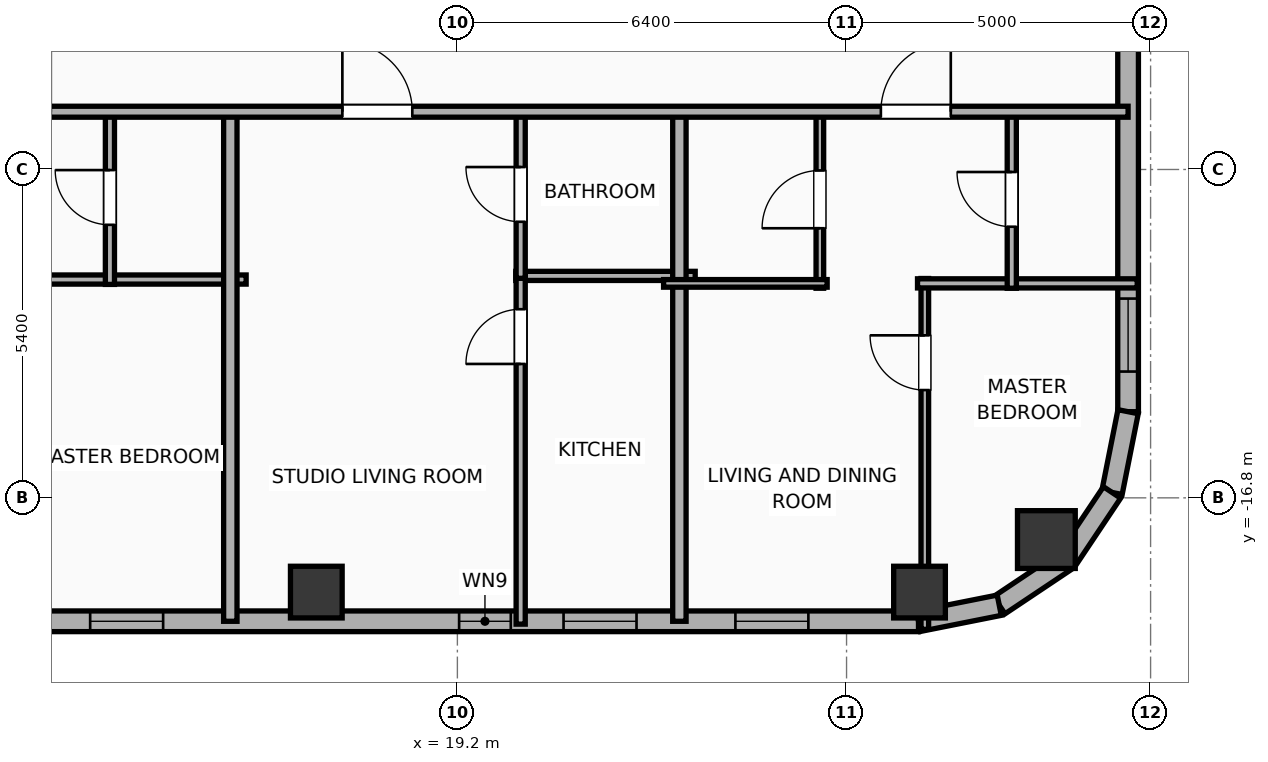
"""IFC4 building model, lengths in metres.
Left out: names, types, materials, properties, quantities, classifications, styles, units other than length and angle.
Written with IfcOpenShell. Run it as: python <this file> out.ifc"""

import sys

from ifc_helpers import new_model, si_unit, direction, frame, frame_2d, origin, origin_2d, place, context, subcontext, project, spatial, rectangle, hollow_rectangle, hollow_circle, extrude, element, fill, save


model = new_model("IFC4")
c1 = context("Model", 3, precision=1e-05, world=origin(), true_north=direction((0.0, 1.0)))
c2 = subcontext(c1, "Body", "Model", "MODEL_VIEW")
j1 = project(units=[si_unit("LENGTHUNIT", "METRE"), si_unit("PLANEANGLEUNIT", "RADIAN")], contexts=[c1])
p1 = place(None, origin())
s1 = spatial("IfcSite", under=j1, at=p1, CompositionType="ELEMENT")
p2 = place(p1, origin())
s2 = spatial("IfcBuilding", under=s1, at=p2, CompositionType="ELEMENT")
p3 = place(p2, frame((0.0, 0.0, 250.9)))
s3 = spatial("IfcBuildingStorey", under=s2, at=p3, CompositionType="ELEMENT", Elevation=250.9)
for number, where, z_axis, x_axis in (
    (1, (16.88, -18.35, 0.0), (0.0, 0.0, 1.0), (1.0, 0.0, 0.0)),
    (2, (26.8, -18.35, 0.0), (0.0, 0.0, 1.0), (1.0, 0.0, 0.0)),
):
    element("IfcColumn", number, at=place(p3, frame(where, z_axis=z_axis, x_axis=x_axis)), inside=s3, PredefinedType="COLUMN", context=c2, shape_type="SweptSolid", body=[
        extrude(hollow_rectangle(XDim=0.85, YDim=0.85, WallThickness=0.028, at=origin_2d()), origin(), (0.0, 0.0, 1.0), 3.865),
    ])
p4 = place(p3, frame((28.886, -17.486, 0.0), z_axis=(0.0, 0.0, 1.0), x_axis=(1.0, 0.0, 0.0)))
e3 = element("IfcColumn", 3, at=p4, inside=s3, PredefinedType="COLUMN", context=c2, shape_type="SweptSolid", body=[
    extrude(hollow_circle(Radius=0.475, WallThickness=0.032, at=origin_2d()), origin(), (0.0, 0.0, 1.0), 3.865),
])
p5 = place(p3, frame((26.783, -18.83, 0.0), z_axis=(0.0, 0.0, 1.0), x_axis=(-1.0, 0.0, 0.0)))
e4 = element("IfcWall", 4, at=p5, inside=s3, PredefinedType="ELEMENTEDWALL", context=c2, shape_type="SweptSolid", body=[
    extrude(rectangle(XDim=49.566, YDim=0.34, at=frame_2d((24.783, 0.0))), origin(), (0.0, 0.0, 1.0), 2.39),
])
p6 = place(p5, frame((23.583, 0.0, 0.75)))
e5 = element("IfcOpeningElement", 5, at=p6, cuts=e4, PredefinedType="OPENING", context=c2, shape_type="SweptSolid", body=[
    extrude(rectangle(XDim=2.4, YDim=1.45, at=frame_2d((1.2, 0.725))), frame((0.0, 0.18, 0.0), z_axis=(0.0, -1.0, 0.0), x_axis=(1.0, 0.0, 0.0)), (0.0, 0.0, 1.0), 0.36),
])
p7 = place(p5, frame((41.756, 0.0, 0.75)))
e6 = element("IfcOpeningElement", 6, at=p7, cuts=e4, PredefinedType="OPENING", context=c2, shape_type="SweptSolid", body=[
    extrude(rectangle(XDim=2.4, YDim=1.45, at=frame_2d((1.2, 0.725))), frame((0.0, 0.18, 0.0), z_axis=(0.0, -1.0, 0.0), x_axis=(1.0, 0.0, 0.0)), (0.0, 0.0, 1.0), 0.36),
])
p8 = place(p5, frame((47.222, 0.0, 0.55)))
e7 = element("IfcOpeningElement", 7, at=p8, cuts=e4, PredefinedType="OPENING", context=c2, shape_type="SweptSolid", body=[
    extrude(rectangle(XDim=1.2, YDim=1.15, at=frame_2d((0.6, 0.575))), frame((0.0, 0.18, 0.0), z_axis=(0.0, -1.0, 0.0), x_axis=(1.0, 0.0, 0.0)), (0.0, 0.0, 1.0), 0.36),
])
p9 = place(p5, frame((45.181, 0.0, 0.55)))
e8 = element("IfcOpeningElement", 8, at=p9, cuts=e4, PredefinedType="OPENING", context=c2, shape_type="SweptSolid", body=[
    extrude(rectangle(XDim=1.2, YDim=1.15, at=frame_2d((0.6, 0.575))), frame((0.0, 0.18, 0.0), z_axis=(0.0, -1.0, 0.0), x_axis=(1.0, 0.0, 0.0)), (0.0, 0.0, 1.0), 0.36),
])
p10 = place(p5, frame((37.289, 0.0, 0.55)))
e9 = element("IfcOpeningElement", 9, at=p10, cuts=e4, PredefinedType="OPENING", context=c2, shape_type="SweptSolid", body=[
    extrude(rectangle(XDim=1.2, YDim=1.15, at=frame_2d((0.6, 0.575))), frame((0.0, 0.18, 0.0), z_axis=(0.0, -1.0, 0.0), x_axis=(1.0, 0.0, 0.0)), (0.0, 0.0, 1.0), 0.36),
])
p11 = place(p5, frame((16.115, 0.0, 0.55)))
e10 = element("IfcOpeningElement", 10, at=p11, cuts=e4, PredefinedType="OPENING", context=c2, shape_type="SweptSolid", body=[
    extrude(rectangle(XDim=1.2, YDim=1.15, at=frame_2d((0.6, 0.575))), frame((0.0, 0.18, 0.0), z_axis=(0.0, -1.0, 0.0), x_axis=(1.0, 0.0, 0.0)), (0.0, 0.0, 1.0), 0.36),
])
p12 = place(p5, frame((12.422, 0.0, 0.55)))
e11 = element("IfcOpeningElement", 11, at=p12, cuts=e4, PredefinedType="OPENING", context=c2, shape_type="SweptSolid", body=[
    extrude(rectangle(XDim=1.2, YDim=1.15, at=frame_2d((0.6, 0.575))), frame((0.0, 0.18, 0.0), z_axis=(0.0, -1.0, 0.0), x_axis=(1.0, 0.0, 0.0)), (0.0, 0.0, 1.0), 0.36),
])
p13 = place(p5, frame((6.705, 0.0, 0.55)))
e12 = element("IfcOpeningElement", 12, at=p13, cuts=e4, PredefinedType="OPENING", context=c2, shape_type="SweptSolid", body=[
    extrude(rectangle(XDim=0.85, YDim=1.15, at=frame_2d((0.425, 0.575))), frame((0.0, 0.18, 0.0), z_axis=(0.0, -1.0, 0.0), x_axis=(1.0, 0.0, 0.0)), (0.0, 0.0, 1.0), 0.36),
])
p14 = place(p5, frame((4.637, 0.0, 0.55)))
e13 = element("IfcOpeningElement", 13, at=p14, cuts=e4, PredefinedType="OPENING", context=c2, shape_type="SweptSolid", body=[
    extrude(rectangle(XDim=1.2, YDim=1.15, at=frame_2d((0.6, 0.575))), frame((0.0, 0.18, 0.0), z_axis=(0.0, -1.0, 0.0), x_axis=(1.0, 0.0, 0.0)), (0.0, 0.0, 1.0), 0.36),
])
p15 = place(p5, frame((1.811, 0.0, 0.55)))
e14 = element("IfcOpeningElement", 14, at=p15, cuts=e4, PredefinedType="OPENING", context=c2, shape_type="SweptSolid", body=[
    extrude(rectangle(XDim=1.2, YDim=1.15, at=frame_2d((0.6, 0.575))), frame((0.0, 0.18, 0.0), z_axis=(0.0, -1.0, 0.0), x_axis=(1.0, 0.0, 0.0)), (0.0, 0.0, 1.0), 0.36),
])
p16 = place(p5, frame((32.253, 0.0, 0.55)))
e15 = element("IfcOpeningElement", 15, at=p16, cuts=e4, PredefinedType="OPENING", context=c2, shape_type="SweptSolid", body=[
    extrude(rectangle(XDim=1.2, YDim=1.15, at=frame_2d((0.6, 0.575))), frame((0.0, 0.18, 0.0), z_axis=(0.0, -1.0, 0.0), x_axis=(1.0, 0.0, 0.0)), (0.0, 0.0, 1.0), 0.36),
])
p17 = place(p5, frame((27.853, 0.0, 0.55)))
e16 = element("IfcOpeningElement", 16, at=p17, cuts=e4, PredefinedType="OPENING", context=c2, shape_type="SweptSolid", body=[
    extrude(rectangle(XDim=1.2, YDim=1.15, at=frame_2d((0.6, 0.575))), frame((0.0, 0.18, 0.0), z_axis=(0.0, -1.0, 0.0), x_axis=(1.0, 0.0, 0.0)), (0.0, 0.0, 1.0), 0.36),
])
p18 = place(p5, frame((20.473, 0.0, 0.55)))
e17 = element("IfcOpeningElement", 17, at=p18, cuts=e4, PredefinedType="OPENING", context=c2, shape_type="SweptSolid", body=[
    extrude(rectangle(XDim=1.2, YDim=1.15, at=frame_2d((0.6, 0.575))), frame((0.0, 0.18, 0.0), z_axis=(0.0, -1.0, 0.0), x_axis=(1.0, 0.0, 0.0)), (0.0, 0.0, 1.0), 0.36),
])
p19 = place(p3, frame((30.23, 16.583, 0.0), z_axis=(0.0, 0.0, 1.0), x_axis=(0.0, -1.0, 0.0)))
e18 = element("IfcWall", 18, at=p19, inside=s3, PredefinedType="ELEMENTEDWALL", context=c2, shape_type="SweptSolid", body=[
    extrude(rectangle(XDim=31.967, YDim=0.34, at=frame_2d((15.983, 0.0))), origin(), (0.0, 0.0, 1.0), 2.39),
])
p20 = place(p19, frame((30.106, 0.0, 0.55)))
e19 = element("IfcOpeningElement", 19, at=p20, cuts=e18, PredefinedType="OPENING", context=c2, shape_type="SweptSolid", body=[
    extrude(rectangle(XDim=1.2, YDim=1.15, at=frame_2d((0.6, 0.575))), frame((0.0, 0.18, 0.0), z_axis=(0.0, -1.0, 0.0), x_axis=(1.0, 0.0, 0.0)), (0.0, 0.0, 1.0), 0.36),
])
p21 = place(p19, frame((11.463, 0.0, 0.55)))
e20 = element("IfcOpeningElement", 20, at=p21, cuts=e18, PredefinedType="OPENING", context=c2, shape_type="SweptSolid", body=[
    extrude(rectangle(XDim=1.2, YDim=1.15, at=frame_2d((0.6, 0.575))), frame((0.0, 0.18, 0.0), z_axis=(0.0, -1.0, 0.0), x_axis=(1.0, 0.0, 0.0)), (0.0, 0.0, 1.0), 0.36),
])
p22 = place(p19, frame((20.363, 0.0, 0.55)))
e21 = element("IfcOpeningElement", 21, at=p22, cuts=e18, PredefinedType="OPENING", context=c2, shape_type="SweptSolid", body=[
    extrude(rectangle(XDim=1.2, YDim=1.15, at=frame_2d((0.6, 0.575))), frame((0.0, 0.18, 0.0), z_axis=(0.0, -1.0, 0.0), x_axis=(1.0, 0.0, 0.0)), (0.0, 0.0, 1.0), 0.36),
])
p23 = place(p3, frame((30.23, -15.383, 0.0), z_axis=(0.0, 0.0, 1.0), x_axis=(-0.195110379894, -0.98078129043, 0.0)))
e22 = element("IfcWall", 22, at=p23, inside=s3, PredefinedType="ELEMENTEDWALL", context=c2, shape_type="SweptSolid", body=[
    extrude(rectangle(XDim=1.354, YDim=0.34, at=frame_2d((0.677, 0.0))), origin(), (0.0, 0.0, 1.0), 3.5),
])
p24 = place(p3, frame((29.966, -16.711, 0.0), z_axis=(0.0, 0.0, 1.0), x_axis=(-0.555584683399, -0.831459956686, 0.0)))
e23 = element("IfcWall", 23, at=p24, inside=s3, PredefinedType="ELEMENTEDWALL", context=c2, shape_type="SweptSolid", body=[
    extrude(rectangle(XDim=1.337, YDim=0.34, at=frame_2d((0.668, 0.0))), origin(), (0.0, 0.0, 1.0), 3.5),
])
p25 = place(p3, frame((29.223, -17.823, 0.0), z_axis=(0.0, 0.0, 1.0), x_axis=(-0.831403586725, -0.555669034571, 0.0)))
e24 = element("IfcWall", 24, at=p25, inside=s3, PredefinedType="ELEMENTEDWALL", context=c2, shape_type="SweptSolid", body=[
    extrude(rectangle(XDim=1.337, YDim=0.34, at=frame_2d((0.668, 0.0))), origin(), (0.0, 0.0, 1.0), 2.39),
])
p26 = place(p3, frame((28.111, -18.566, 0.0), z_axis=(0.0, 0.0, 1.0), x_axis=(-0.980788153188, -0.195075878998, 0.0)))
e25 = element("IfcWall", 25, at=p26, inside=s3, PredefinedType="ELEMENTEDWALL", context=c2, shape_type="SweptSolid", body=[
    extrude(rectangle(XDim=1.354, YDim=0.34, at=frame_2d((0.677, 0.0))), origin(), (0.0, 0.0, 1.0), 2.39),
])
p27 = place(p3, frame((11.936, -13.21, 0.0), z_axis=(0.0, 0.0, 1.0), x_axis=(1.0, 0.0, 0.0)))
e26 = element("IfcWall", 26, at=p27, inside=s3, PredefinedType="PLUMBINGWALL", context=c2, shape_type="SweptSolid", body=[
    extrude(rectangle(XDim=3.79, YDim=0.15, at=frame_2d((1.895, 0.0))), origin(), (0.0, 0.0, 1.0), 3.5),
])
p28 = place(p3, frame((13.486, -13.29, 0.0), z_axis=(0.0, 0.0, 1.0), x_axis=(0.0, 1.0, 0.0)))
e27 = element("IfcWall", 27, at=p28, inside=s3, PredefinedType="PLUMBINGWALL", context=c2, shape_type="SweptSolid", body=[
    extrude(rectangle(XDim=2.86, YDim=0.15, at=frame_2d((1.43, 0.0))), origin(), (0.0, 0.0, 1.0), 3.5),
])
p29 = place(p28, frame((0.98, 0.0, 0.0)))
e28 = element("IfcOpeningElement", 28, at=p29, cuts=e27, PredefinedType="OPENING", context=c2, shape_type="SweptSolid", body=[
    extrude(rectangle(XDim=0.9, YDim=2.05, at=frame_2d((0.45, 1.025))), frame((0.0, 0.085, 0.0), z_axis=(0.0, -1.0, 0.0), x_axis=(1.0, 0.0, 0.0)), (0.0, 0.0, 1.0), 0.17),
])
p30 = place(p3, frame((15.466, -18.83, 0.0), z_axis=(0.0, 0.0, 1.0), x_axis=(0.0, 1.0, 0.0)))
e29 = element("IfcWall", 29, at=p30, inside=s3, PredefinedType="PARTITIONING", context=c2, shape_type="SweptSolid", body=[
    extrude(rectangle(XDim=8.46, YDim=0.22, at=frame_2d((4.23, 0.0))), origin(), (0.0, 0.0, 1.0), 2.39),
])
p31 = place(p3, frame((20.161, -13.15, 0.0), z_axis=(0.0, 0.0, 1.0), x_axis=(1.0, 0.0, 0.0)))
e30 = element("IfcWall", 30, at=p31, inside=s3, PredefinedType="PLUMBINGWALL", context=c2, shape_type="SweptSolid", body=[
    extrude(rectangle(XDim=2.95, YDim=0.15, at=frame_2d((1.475, 0.0))), origin(), (0.0, 0.0, 1.0), 3.5),
])
p32 = place(p3, frame((20.241, -18.877, 0.0), z_axis=(0.0, 0.0, 1.0), x_axis=(0.0, 1.0, 0.0)))
e31 = element("IfcWall", 31, at=p32, inside=s3, PredefinedType="PLUMBINGWALL", context=c2, shape_type="SweptSolid", body=[
    extrude(rectangle(XDim=5.767, YDim=0.15, at=frame_2d((2.883, 0.0))), origin(), (0.0, 0.0, 1.0), 2.39),
])
p33 = place(p32, frame((4.279, 0.0, 0.0)))
e32 = element("IfcOpeningElement", 32, at=p33, cuts=e31, PredefinedType="OPENING", context=c2, shape_type="SweptSolid", body=[
    extrude(rectangle(XDim=0.9, YDim=2.05, at=frame_2d((0.45, 1.025))), frame((0.0, 0.085, 0.0), z_axis=(0.0, -1.0, 0.0), x_axis=(1.0, 0.0, 0.0)), (0.0, 0.0, 1.0), 0.17),
])
p34 = place(p3, frame((20.241, -13.19, 0.0), z_axis=(0.0, 0.0, 1.0), x_axis=(0.0, 1.0, 0.0)))
e33 = element("IfcWall", 33, at=p34, inside=s3, PredefinedType="PLUMBINGWALL", context=c2, shape_type="SweptSolid", body=[
    extrude(rectangle(XDim=2.76, YDim=0.15, at=frame_2d((1.38, 0.0))), origin(), (0.0, 0.0, 1.0), 2.39),
])
p35 = place(p34, frame((0.93, 0.0, 0.0)))
e34 = element("IfcOpeningElement", 34, at=p35, cuts=e33, PredefinedType="OPENING", context=c2, shape_type="SweptSolid", body=[
    extrude(rectangle(XDim=0.9, YDim=2.05, at=frame_2d((0.45, 1.025))), frame((0.0, 0.085, 0.0), z_axis=(0.0, -1.0, 0.0), x_axis=(1.0, 0.0, 0.0)), (0.0, 0.0, 1.0), 0.17),
])
p36 = place(p3, frame((22.851, -18.83, 0.0), z_axis=(0.0, 0.0, 1.0), x_axis=(0.0, 1.0, 0.0)))
e35 = element("IfcWall", 35, at=p36, inside=s3, PredefinedType="PARTITIONING", context=c2, shape_type="SweptSolid", body=[
    extrude(rectangle(XDim=8.46, YDim=0.22, at=frame_2d((4.23, 0.0))), origin(), (0.0, 0.0, 1.0), 2.39),
])
p37 = place(p3, frame((26.887, -18.962, 0.0), z_axis=(0.0, 0.0, 1.0), x_axis=(0.0, 1.0, 0.0)))
e36 = element("IfcWall", 36, at=p37, inside=s3, PredefinedType="PARTITIONING", context=c2, shape_type="SweptSolid", body=[
    extrude(rectangle(XDim=5.769, YDim=0.125, at=frame_2d((2.885, 0.0))), origin(), (0.0, 0.0, 1.0), 3.5),
])
p38 = place(p37, frame((3.935, 0.0, 0.0)))
e37 = element("IfcOpeningElement", 37, at=p38, cuts=e36, PredefinedType="OPENING", context=c2, shape_type="SweptSolid", body=[
    extrude(rectangle(XDim=0.9, YDim=2.05, at=frame_2d((0.45, 1.025))), frame((0.0, 0.073, 0.0), z_axis=(0.0, -1.0, 0.0), x_axis=(1.0, 0.0, 0.0)), (0.0, 0.0, 1.0), 0.145),
])
p39 = place(p3, frame((26.767, -13.273, 0.0), z_axis=(0.0, 0.0, 1.0), x_axis=(1.0, 0.0, 0.0)))
e38 = element("IfcWall", 38, at=p39, inside=s3, PredefinedType="PLUMBINGWALL", context=c2, shape_type="SweptSolid", body=[
    extrude(rectangle(XDim=3.613, YDim=0.15, at=frame_2d((1.806, 0.0))), origin(), (0.0, 0.0, 1.0), 3.5),
])
p40 = place(p3, frame((25.161, -13.353, 0.0), z_axis=(0.0, 0.0, 1.0), x_axis=(0.0, 1.0, 0.0)))
e39 = element("IfcWall", 39, at=p40, inside=s3, PredefinedType="PARTITIONING", context=c2, shape_type="SweptSolid", body=[
    extrude(rectangle(XDim=2.923, YDim=0.125, at=frame_2d((1.461, 0.0))), origin(), (0.0, 0.0, 1.0), 3.5),
])
p41 = place(p40, frame((0.987, 0.0, 0.0)))
e40 = element("IfcOpeningElement", 40, at=p41, cuts=e39, PredefinedType="OPENING", context=c2, shape_type="SweptSolid", body=[
    extrude(rectangle(XDim=0.95, YDim=2.05, at=frame_2d((0.475, 1.025))), frame((0.0, 0.073, 0.0), z_axis=(0.0, -1.0, 0.0), x_axis=(1.0, 0.0, 0.0)), (0.0, 0.0, 1.0), 0.145),
])
p42 = place(p3, frame((22.591, -13.273, 0.0), z_axis=(0.0, 0.0, 1.0), x_axis=(1.0, 0.0, 0.0)))
e41 = element("IfcWall", 41, at=p42, inside=s3, PredefinedType="PARTITIONING", context=c2, shape_type="SweptSolid", body=[
    extrude(rectangle(XDim=2.69, YDim=0.125, at=frame_2d((1.345, 0.0))), origin(), (0.0, 0.0, 1.0), 3.5),
])
p43 = place(p3, frame((28.317, -13.353, 0.0), z_axis=(0.0, 0.0, 1.0), x_axis=(0.0, 1.0, 0.0)))
e42 = element("IfcWall", 42, at=p43, inside=s3, PredefinedType="PLUMBINGWALL", context=c2, shape_type="SweptSolid", body=[
    extrude(rectangle(XDim=2.923, YDim=0.15, at=frame_2d((1.461, 0.0))), origin(), (0.0, 0.0, 1.0), 3.5),
])
p44 = place(p43, frame((1.011, 0.0, 0.0)))
e43 = element("IfcOpeningElement", 43, at=p44, cuts=e42, PredefinedType="OPENING", context=c2, shape_type="SweptSolid", body=[
    extrude(rectangle(XDim=0.9, YDim=2.05, at=frame_2d((0.45, 1.025))), frame((0.0, 0.085, 0.0), z_axis=(0.0, -1.0, 0.0), x_axis=(1.0, 0.0, 0.0)), (0.0, 0.0, 1.0), 0.17),
])
p45 = place(p3, frame((8.08, -10.45, 0.0), z_axis=(0.0, 0.0, 1.0), x_axis=(1.0, 0.0, 0.0)))
e44 = element("IfcWall", 44, at=p45, inside=s3, PredefinedType="PARTITIONING", context=c2, shape_type="SweptSolid", body=[
    extrude(rectangle(XDim=22.15, YDim=0.18, at=frame_2d((11.075, 0.0))), origin(), (0.0, 0.0, 1.0), 3.5),
])
p46 = place(p45, frame((3.283, 0.0, 0.0)))
e45 = element("IfcOpeningElement", 45, at=p46, cuts=e44, PredefinedType="OPENING", context=c2, shape_type="SweptSolid", body=[
    extrude(rectangle(XDim=1.15, YDim=2.05, at=frame_2d((0.575, 1.025))), frame((0.0, 0.1, 0.0), z_axis=(0.0, -1.0, 0.0), x_axis=(1.0, 0.0, 0.0)), (0.0, 0.0, 1.0), 0.2),
])
p47 = place(p45, frame((9.229, 0.0, 0.0)))
e46 = element("IfcOpeningElement", 46, at=p47, cuts=e44, PredefinedType="OPENING", context=c2, shape_type="SweptSolid", body=[
    extrude(rectangle(XDim=1.15, YDim=2.05, at=frame_2d((0.575, 1.025))), frame((0.0, 0.1, 0.0), z_axis=(0.0, -1.0, 0.0), x_axis=(1.0, 0.0, 0.0)), (0.0, 0.0, 1.0), 0.2),
])
p48 = place(p45, frame((18.084, 0.0, 0.0)))
e47 = element("IfcOpeningElement", 47, at=p48, cuts=e44, PredefinedType="OPENING", context=c2, shape_type="SweptSolid", body=[
    extrude(rectangle(XDim=1.15, YDim=2.05, at=frame_2d((0.575, 1.025))), frame((0.0, 0.1, 0.0), z_axis=(0.0, -1.0, 0.0), x_axis=(1.0, 0.0, 0.0)), (0.0, 0.0, 1.0), 0.2),
])
p49 = place(p12, origin())
e48 = element("IfcWindow", 48, at=p49, inside=s3, PartitioningType="SINGLE_PANEL", PredefinedType="WINDOW", context=c2, shape_type="SweptSolid", body=[
    extrude(rectangle(XDim=1.2, YDim=1.15, at=frame_2d((0.6, 0.575))), frame((0.0, 0.03, 0.0), z_axis=(0.0, -1.0, 0.0), x_axis=(1.0, 0.0, 0.0)), (0.0, 0.0, 1.0), 0.06),
])
fill(e11, e48)
p50 = place(p13, origin())
e49 = element("IfcWindow", 49, at=p50, inside=s3, PartitioningType="SINGLE_PANEL", PredefinedType="WINDOW", context=c2, shape_type="SweptSolid", body=[
    extrude(rectangle(XDim=0.85, YDim=1.15, at=frame_2d((0.425, 0.575))), frame((0.0, 0.03, 0.0), z_axis=(0.0, -1.0, 0.0), x_axis=(1.0, 0.0, 0.0)), (0.0, 0.0, 1.0), 0.06),
])
fill(e12, e49)
p51 = place(p14, origin())
e50 = element("IfcWindow", 50, at=p51, inside=s3, PartitioningType="SINGLE_PANEL", PredefinedType="WINDOW", context=c2, shape_type="SweptSolid", body=[
    extrude(rectangle(XDim=1.2, YDim=1.15, at=frame_2d((0.6, 0.575))), frame((0.0, 0.03, 0.0), z_axis=(0.0, -1.0, 0.0), x_axis=(1.0, 0.0, 0.0)), (0.0, 0.0, 1.0), 0.06),
])
fill(e13, e50)
p52 = place(p15, origin())
e51 = element("IfcWindow", 51, at=p52, inside=s3, PartitioningType="SINGLE_PANEL", PredefinedType="WINDOW", context=c2, shape_type="SweptSolid", body=[
    extrude(rectangle(XDim=1.2, YDim=1.15, at=frame_2d((0.6, 0.575))), frame((0.0, 0.03, 0.0), z_axis=(0.0, -1.0, 0.0), x_axis=(1.0, 0.0, 0.0)), (0.0, 0.0, 1.0), 0.06),
])
fill(e14, e51)
p53 = place(p20, origin())
e52 = element("IfcWindow", 52, at=p53, inside=s3, PartitioningType="SINGLE_PANEL", PredefinedType="WINDOW", context=c2, shape_type="SweptSolid", body=[
    extrude(rectangle(XDim=1.2, YDim=1.15, at=frame_2d((0.6, 0.575))), frame((0.0, 0.03, 0.0), z_axis=(0.0, -1.0, 0.0), x_axis=(1.0, 0.0, 0.0)), (0.0, 0.0, 1.0), 0.06),
])
fill(e19, e52)
p54 = place(p29, origin())
e53 = element("IfcDoor", 53, at=p54, inside=s3, OperationType="SINGLE_SWING_RIGHT", PredefinedType="DOOR", context=c2, shape_type="SweptSolid", body=[
    extrude(rectangle(XDim=0.9, YDim=2.05, at=frame_2d((0.45, 1.025))), frame((0.0, 0.025, 0.0), z_axis=(0.0, -1.0, 0.0), x_axis=(1.0, 0.0, 0.0)), (0.0, 0.0, 1.0), 0.05),
])
fill(e28, e53)
p55 = place(p33, origin())
e54 = element("IfcDoor", 54, at=p55, inside=s3, OperationType="SINGLE_SWING_LEFT", PredefinedType="DOOR", context=c2, shape_type="SweptSolid", body=[
    extrude(rectangle(XDim=0.9, YDim=2.05, at=frame_2d((0.45, 1.025))), frame((0.0, 0.025, 0.0), z_axis=(0.0, -1.0, 0.0), x_axis=(1.0, 0.0, 0.0)), (0.0, 0.0, 1.0), 0.05),
])
fill(e32, e54)
p56 = place(p35, origin())
e55 = element("IfcDoor", 55, at=p56, inside=s3, OperationType="SINGLE_SWING_RIGHT", PredefinedType="DOOR", context=c2, shape_type="SweptSolid", body=[
    extrude(rectangle(XDim=0.9, YDim=2.05, at=frame_2d((0.45, 1.025))), frame((0.0, 0.025, 0.0), z_axis=(0.0, -1.0, 0.0), x_axis=(1.0, 0.0, 0.0)), (0.0, 0.0, 1.0), 0.05),
])
fill(e34, e55)
p57 = place(p38, origin())
e56 = element("IfcDoor", 56, at=p57, inside=s3, OperationType="SINGLE_SWING_RIGHT", PredefinedType="DOOR", context=c2, shape_type="SweptSolid", body=[
    extrude(rectangle(XDim=0.9, YDim=2.05, at=frame_2d((0.45, 1.025))), frame((0.0, 0.025, 0.0), z_axis=(0.0, -1.0, 0.0), x_axis=(1.0, 0.0, 0.0)), (0.0, 0.0, 1.0), 0.05),
])
fill(e37, e56)
p58 = place(p41, origin())
e57 = element("IfcDoor", 57, at=p58, inside=s3, OperationType="SINGLE_SWING_LEFT", PredefinedType="DOOR", context=c2, shape_type="SweptSolid", body=[
    extrude(rectangle(XDim=0.95, YDim=2.05, at=frame_2d((0.475, 1.025))), frame((0.0, 0.025, 0.0), z_axis=(0.0, -1.0, 0.0), x_axis=(1.0, 0.0, 0.0)), (0.0, 0.0, 1.0), 0.05),
])
fill(e40, e57)
p59 = place(p44, origin())
e58 = element("IfcDoor", 58, at=p59, inside=s3, OperationType="SINGLE_SWING_RIGHT", PredefinedType="DOOR", context=c2, shape_type="SweptSolid", body=[
    extrude(rectangle(XDim=0.9, YDim=2.05, at=frame_2d((0.45, 1.025))), frame((0.0, 0.025, 0.0), z_axis=(0.0, -1.0, 0.0), x_axis=(1.0, 0.0, 0.0)), (0.0, 0.0, 1.0), 0.05),
])
fill(e43, e58)
p60 = place(p47, origin())
e59 = element("IfcDoor", 59, at=p60, inside=s3, OperationType="SINGLE_SWING_LEFT", PredefinedType="DOOR", context=c2, shape_type="SweptSolid", body=[
    extrude(rectangle(XDim=1.15, YDim=2.05, at=frame_2d((0.575, 1.025))), frame((0.0, 0.025, 0.0), z_axis=(0.0, -1.0, 0.0), x_axis=(1.0, 0.0, 0.0)), (0.0, 0.0, 1.0), 0.05),
])
fill(e46, e59)
p61 = place(p48, origin())
e60 = element("IfcDoor", 60, at=p61, inside=s3, OperationType="SINGLE_SWING_RIGHT", PredefinedType="DOOR", context=c2, shape_type="SweptSolid", body=[
    extrude(rectangle(XDim=1.15, YDim=2.05, at=frame_2d((0.575, 1.025))), frame((0.0, 0.025, 0.0), z_axis=(0.0, -1.0, 0.0), x_axis=(1.0, 0.0, 0.0)), (0.0, 0.0, 1.0), 0.05),
])
fill(e47, e60)
save(model, sys.argv[1])
